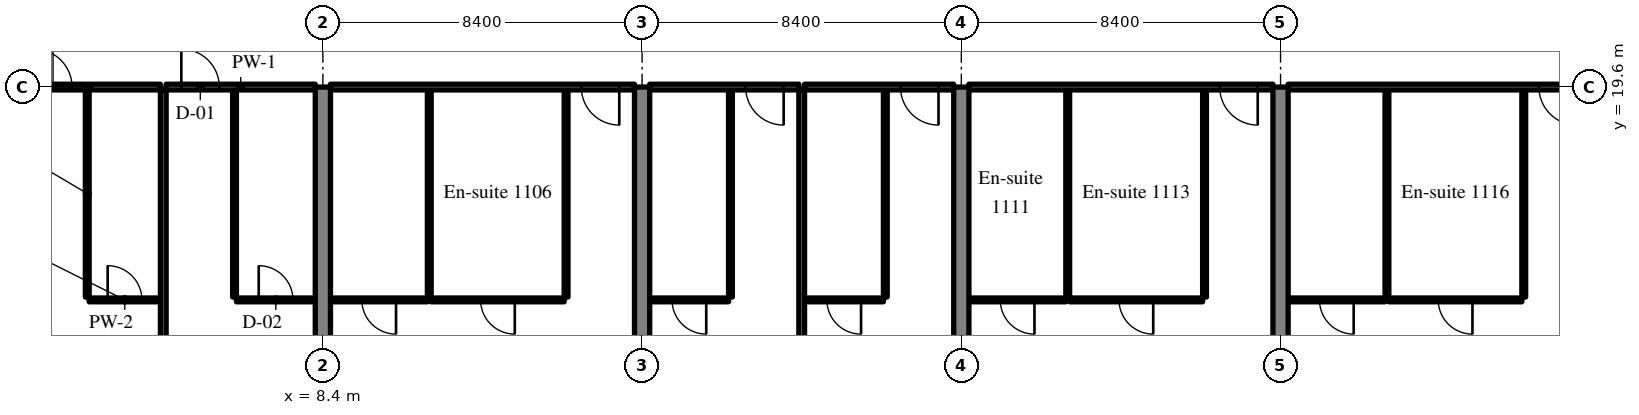
"""IFC4 building model, lengths in metres.
Left out: names, types, materials, properties, quantities, classifications, styles, units other than length and angle.
Written with IfcOpenShell. Run it as: python <this file> out.ifc"""

import sys

from ifc_helpers import new_model, si_unit, direction, frame, frame_2d, origin, place, context, subcontext, project, spatial, rectangle, extrude, source, transform, mapped, element, fill, save


model = new_model("IFC4")
c1 = context("Model", 3, precision=1e-05, world=origin(), true_north=direction((0.0, 1.0)))
c2 = subcontext(c1, "Body", "Model", "MODEL_VIEW")
j1 = project(units=[si_unit("LENGTHUNIT", "METRE"), si_unit("PLANEANGLEUNIT", "RADIAN")], contexts=[c1])
p1 = place(None, origin())
s1 = spatial("IfcSite", under=j1, at=p1, CompositionType="ELEMENT")
p2 = place(p1, origin())
s2 = spatial("IfcBuilding", under=s1, at=p2, CompositionType="ELEMENT")
p3 = place(p2, frame((0.0, 0.0, 50.6)))
s3 = spatial("IfcBuildingStorey", under=s2, at=p3, CompositionType="ELEMENT", Elevation=50.6)
m1 = source(origin(), c2, "Body", "SweptSolid", [
    extrude(rectangle(XDim=19.6, YDim=0.4, at=frame_2d((9.8, 0.0))), origin(), (0.0, 0.0, 1.0), 3.52),
])
for number, where, z_axis, x_axis in (
    (1, (8.4, 0.0, 0.0), (0.0, 0.0, 1.0), (0.0, 1.0, 0.0)),
    (2, (16.8, 0.0, 0.0), (0.0, 0.0, 1.0), (0.0, 1.0, 0.0)),
    (3, (25.2, 0.0, 0.0), (0.0, 0.0, 1.0), (0.0, 1.0, 0.0)),
    (4, (33.6, 0.0, 0.0), (0.0, 0.0, 1.0), (0.0, 1.0, 0.0)),
):
    element("IfcWall", number, at=place(p3, frame(where, z_axis=z_axis, x_axis=x_axis)), inside=s3, PredefinedType="SHEAR", context=c2, shape_type="MappedRepresentation", body=[
        mapped(m1, transform((0.0, 0.0, 0.0), scale=1.0)),
    ])
m2 = source(origin(), c2, "Body", "SweptSolid", [
    extrude(rectangle(XDim=5.45, YDim=0.1, at=frame_2d((2.725, 0.0))), origin(), (0.0, 0.0, 1.0), 3.52),
])
p4 = place(p3, frame((2.2, 14.075, 0.0), z_axis=(0.0, 0.0, 1.0), x_axis=(0.0, 1.0, 0.0)))
e5 = element("IfcWall", 5, at=p4, inside=s3, PredefinedType="PARTITIONING", context=c2, shape_type="MappedRepresentation", body=[
    mapped(m2, transform((0.0, 0.0, 0.0), scale=1.0)),
])
m3 = source(origin(), c2, "Body", "SweptSolid", [
    extrude(rectangle(XDim=1.875, YDim=0.1, at=frame_2d((0.938, 0.0))), origin(), (0.0, 0.0, 1.0), 3.52),
])
p5 = place(p3, frame((2.25, 14.0, 0.0), z_axis=(0.0, 0.0, 1.0), x_axis=(1.0, 0.0, 0.0)))
e6 = element("IfcWall", 6, at=p5, inside=s3, PredefinedType="PARTITIONING", context=c2, shape_type="MappedRepresentation", body=[
    mapped(m3, transform((0.0, 0.0, 0.0), scale=1.0)),
])
m4 = source(origin(), c2, "Body", "SweptSolid", [
    extrude(rectangle(XDim=0.9, YDim=2.1, at=frame_2d((0.45, 1.05))), frame((0.0, 0.06, 0.0), z_axis=(0.0, -1.0, 0.0), x_axis=(1.0, 0.0, 0.0)), (0.0, 0.0, 1.0), 0.12),
])
p6 = place(p5, frame((0.487, 0.0, 0.0)))
e7 = element("IfcOpeningElement", 7, at=p6, cuts=e6, PredefinedType="OPENING", context=c2, shape_type="MappedRepresentation", body=[
    mapped(m4, transform((0.0, 0.0, 0.0), scale=1.0)),
])
m5 = source(origin(), c2, "Body", "SweptSolid", [
    extrude(rectangle(XDim=3.725, YDim=0.15, at=frame_2d((1.863, 0.0))), origin(), (0.0, 0.0, 1.0), 2.82),
])
p7 = place(p3, frame((0.4, 19.6, 0.0), z_axis=(0.0, 0.0, 1.0), x_axis=(1.0, 0.0, 0.0)))
e8 = element("IfcWall", 8, at=p7, inside=s3, PredefinedType="PARTITIONING", context=c2, shape_type="MappedRepresentation", body=[
    mapped(m5, transform((0.0, 0.0, 0.0), scale=1.0)),
])
m6 = source(origin(), c2, "Body", "SweptSolid", [
    extrude(rectangle(XDim=1.0, YDim=2.1, at=frame_2d((0.5, 1.05))), frame((0.0, 0.085, 0.0), z_axis=(0.0, -1.0, 0.0), x_axis=(1.0, 0.0, 0.0)), (0.0, 0.0, 1.0), 0.17),
])
p8 = place(p7, frame((0.4, 0.0, 0.0)))
e9 = element("IfcOpeningElement", 9, at=p8, cuts=e8, PredefinedType="OPENING", context=c2, shape_type="MappedRepresentation", body=[
    mapped(m6, transform((0.0, 0.0, 0.0), scale=1.0)),
])
p9 = place(p3, frame((6.075, 14.075, 0.0), z_axis=(0.0, 0.0, 1.0), x_axis=(0.0, 1.0, 0.0)))
e10 = element("IfcWall", 10, at=p9, inside=s3, PredefinedType="PARTITIONING", context=c2, shape_type="MappedRepresentation", body=[
    mapped(m2, transform((0.0, 0.0, 0.0), scale=1.0)),
])
m7 = source(origin(), c2, "Body", "SweptSolid", [
    extrude(rectangle(XDim=2.075, YDim=0.1, at=frame_2d((1.038, 0.0))), origin(), (0.0, 0.0, 1.0), 3.52),
])
p10 = place(p3, frame((6.125, 14.0, 0.0), z_axis=(0.0, 0.0, 1.0), x_axis=(1.0, 0.0, 0.0)))
e11 = element("IfcWall", 11, at=p10, inside=s3, PredefinedType="PARTITIONING", context=c2, shape_type="MappedRepresentation", body=[
    mapped(m7, transform((0.0, 0.0, 0.0), scale=1.0)),
])
p11 = place(p10, frame((0.587, 0.0, 0.0)))
e12 = element("IfcOpeningElement", 12, at=p11, cuts=e11, PredefinedType="OPENING", context=c2, shape_type="MappedRepresentation", body=[
    mapped(m4, transform((0.0, 0.0, 0.0), scale=1.0)),
])
m8 = source(origin(), c2, "Body", "SweptSolid", [
    extrude(rectangle(XDim=3.925, YDim=0.15, at=frame_2d((1.962, 0.0))), origin(), (0.0, 0.0, 1.0), 2.82),
])
p12 = place(p3, frame((4.275, 19.6, 0.0), z_axis=(0.0, 0.0, 1.0), x_axis=(1.0, 0.0, 0.0)))
e13 = element("IfcWall", 13, at=p12, inside=s3, PredefinedType="PARTITIONING", context=c2, shape_type="MappedRepresentation", body=[
    mapped(m8, transform((0.0, 0.0, 0.0), scale=1.0)),
])
p13 = place(p12, frame((0.4, 0.0, 0.0)))
e14 = element("IfcOpeningElement", 14, at=p13, cuts=e13, PredefinedType="OPENING", context=c2, shape_type="MappedRepresentation", body=[
    mapped(m6, transform((0.0, 0.0, 0.0), scale=1.0)),
])
m9 = source(origin(), c2, "Body", "SweptSolid", [
    extrude(rectangle(XDim=18.947, YDim=0.15, at=frame_2d((9.474, 0.0))), origin(), (0.0, 0.0, 1.0), 3.52),
])
p14 = place(p3, frame((4.2, 0.578, 0.0), z_axis=(0.0, 0.0, 1.0), x_axis=(0.0, 1.0, 0.0)))
e15 = element("IfcWall", 15, at=p14, inside=s3, PredefinedType="PARTITIONING", context=c2, shape_type="MappedRepresentation", body=[
    mapped(m9, transform((0.0, 0.0, 0.0), scale=1.0)),
])
for number, where, z_axis, x_axis in (
    (16, (14.8, 14.075, 0.0), (0.0, 0.0, 1.0), (0.0, 1.0, 0.0)),
    (17, (11.2, 14.075, 0.0), (0.0, 0.0, 1.0), (0.0, 1.0, 0.0)),
):
    element("IfcWall", number, at=place(p3, frame(where, z_axis=z_axis, x_axis=x_axis)), inside=s3, PredefinedType="PARTITIONING", context=c2, shape_type="MappedRepresentation", body=[
        mapped(m2, transform((0.0, 0.0, 0.0), scale=1.0)),
    ])
m10 = source(origin(), c2, "Body", "SweptSolid", [
    extrude(rectangle(XDim=3.5, YDim=0.1, at=frame_2d((1.75, 0.0))), origin(), (0.0, 0.0, 1.0), 3.52),
])
p15 = place(p3, frame((11.25, 14.0, 0.0), z_axis=(0.0, 0.0, 1.0), x_axis=(1.0, 0.0, 0.0)))
e18 = element("IfcWall", 18, at=p15, inside=s3, PredefinedType="PARTITIONING", context=c2, shape_type="MappedRepresentation", body=[
    mapped(m10, transform((0.0, 0.0, 0.0), scale=1.0)),
])
p16 = place(p15, frame((1.3, 0.0, 0.0)))
e19 = element("IfcOpeningElement", 19, at=p16, cuts=e18, PredefinedType="OPENING", context=c2, shape_type="MappedRepresentation", body=[
    mapped(m4, transform((0.0, 0.0, 0.0), scale=1.0)),
])
m11 = source(origin(), c2, "Body", "SweptSolid", [
    extrude(rectangle(XDim=2.55, YDim=0.1, at=frame_2d((1.275, 0.0))), origin(), (0.0, 0.0, 1.0), 3.52),
])
p17 = place(p3, frame((8.6, 14.0, 0.0), z_axis=(0.0, 0.0, 1.0), x_axis=(1.0, 0.0, 0.0)))
e20 = element("IfcWall", 20, at=p17, inside=s3, PredefinedType="PARTITIONING", context=c2, shape_type="MappedRepresentation", body=[
    mapped(m11, transform((0.0, 0.0, 0.0), scale=1.0)),
])
p18 = place(p17, frame((0.825, 0.0, 0.0)))
e21 = element("IfcOpeningElement", 21, at=p18, cuts=e20, PredefinedType="OPENING", context=c2, shape_type="MappedRepresentation", body=[
    mapped(m4, transform((0.0, 0.0, 0.0), scale=1.0)),
])
m12 = source(origin(), c2, "Body", "SweptSolid", [
    extrude(rectangle(XDim=8.0, YDim=0.15, at=frame_2d((4.0, 0.0))), origin(), (0.0, 0.0, 1.0), 2.82),
])
p19 = place(p3, frame((8.6, 19.6, 0.0), z_axis=(0.0, 0.0, 1.0), x_axis=(1.0, 0.0, 0.0)))
e22 = element("IfcWall", 22, at=p19, inside=s3, PredefinedType="PARTITIONING", context=c2, shape_type="MappedRepresentation", body=[
    mapped(m12, transform((0.0, 0.0, 0.0), scale=1.0)),
])
p20 = place(p19, frame((6.6, 0.0, 0.0)))
e23 = element("IfcOpeningElement", 23, at=p20, cuts=e22, PredefinedType="OPENING", context=c2, shape_type="MappedRepresentation", body=[
    mapped(m6, transform((0.0, 0.0, 0.0), scale=1.0)),
])
p21 = place(p3, frame((19.125, 14.075, 0.0), z_axis=(0.0, 0.0, 1.0), x_axis=(0.0, 1.0, 0.0)))
e24 = element("IfcWall", 24, at=p21, inside=s3, PredefinedType="PARTITIONING", context=c2, shape_type="MappedRepresentation", body=[
    mapped(m2, transform((0.0, 0.0, 0.0), scale=1.0)),
])
p22 = place(p3, frame((17.0, 14.0, 0.0), z_axis=(0.0, 0.0, 1.0), x_axis=(1.0, 0.0, 0.0)))
e25 = element("IfcWall", 25, at=p22, inside=s3, PredefinedType="PARTITIONING", context=c2, shape_type="MappedRepresentation", body=[
    mapped(m7, transform((0.0, 0.0, 0.0), scale=1.0)),
])
p23 = place(p22, frame((0.588, 0.0, 0.0)))
e26 = element("IfcOpeningElement", 26, at=p23, cuts=e25, PredefinedType="OPENING", context=c2, shape_type="MappedRepresentation", body=[
    mapped(m4, transform((0.0, 0.0, 0.0), scale=1.0)),
])
p24 = place(p3, frame((17.0, 19.6, 0.0), z_axis=(0.0, 0.0, 1.0), x_axis=(1.0, 0.0, 0.0)))
e27 = element("IfcWall", 27, at=p24, inside=s3, PredefinedType="PARTITIONING", context=c2, shape_type="MappedRepresentation", body=[
    mapped(m8, transform((0.0, 0.0, 0.0), scale=1.0)),
])
p25 = place(p24, frame((2.525, 0.0, 0.0)))
e28 = element("IfcOpeningElement", 28, at=p25, cuts=e27, PredefinedType="OPENING", context=c2, shape_type="MappedRepresentation", body=[
    mapped(m6, transform((0.0, 0.0, 0.0), scale=1.0)),
])
p26 = place(p3, frame((23.2, 14.075, 0.0), z_axis=(0.0, 0.0, 1.0), x_axis=(0.0, 1.0, 0.0)))
e29 = element("IfcWall", 29, at=p26, inside=s3, PredefinedType="PARTITIONING", context=c2, shape_type="MappedRepresentation", body=[
    mapped(m2, transform((0.0, 0.0, 0.0), scale=1.0)),
])
p27 = place(p3, frame((21.075, 14.0, 0.0), z_axis=(0.0, 0.0, 1.0), x_axis=(1.0, 0.0, 0.0)))
e30 = element("IfcWall", 30, at=p27, inside=s3, PredefinedType="PARTITIONING", context=c2, shape_type="MappedRepresentation", body=[
    mapped(m7, transform((0.0, 0.0, 0.0), scale=1.0)),
])
p28 = place(p27, frame((0.587, 0.0, 0.0)))
e31 = element("IfcOpeningElement", 31, at=p28, cuts=e30, PredefinedType="OPENING", context=c2, shape_type="MappedRepresentation", body=[
    mapped(m4, transform((0.0, 0.0, 0.0), scale=1.0)),
])
p29 = place(p3, frame((21.075, 19.6, 0.0), z_axis=(0.0, 0.0, 1.0), x_axis=(1.0, 0.0, 0.0)))
e32 = element("IfcWall", 32, at=p29, inside=s3, PredefinedType="PARTITIONING", context=c2, shape_type="MappedRepresentation", body=[
    mapped(m8, transform((0.0, 0.0, 0.0), scale=1.0)),
])
p30 = place(p29, frame((2.525, 0.0, 0.0)))
e33 = element("IfcOpeningElement", 33, at=p30, cuts=e32, PredefinedType="OPENING", context=c2, shape_type="MappedRepresentation", body=[
    mapped(m6, transform((0.0, 0.0, 0.0), scale=1.0)),
])
m13 = source(origin(), c2, "Body", "SweptSolid", [
    extrude(rectangle(XDim=18.725, YDim=0.15, at=frame_2d((9.362, 0.0))), origin(), (0.0, 0.0, 1.0), 3.52),
])
p31 = place(p3, frame((21.0, 0.8, 0.0), z_axis=(0.0, 0.0, 1.0), x_axis=(0.0, 1.0, 0.0)))
e34 = element("IfcWall", 34, at=p31, inside=s3, PredefinedType="PARTITIONING", context=c2, shape_type="MappedRepresentation", body=[
    mapped(m13, transform((0.0, 0.0, 0.0), scale=1.0)),
])
for number, where, z_axis, x_axis in (
    (35, (31.6, 14.075, 0.0), (0.0, 0.0, 1.0), (0.0, 1.0, 0.0)),
    (36, (28.0, 14.075, 0.0), (0.0, 0.0, 1.0), (0.0, 1.0, 0.0)),
):
    element("IfcWall", number, at=place(p3, frame(where, z_axis=z_axis, x_axis=x_axis)), inside=s3, PredefinedType="PARTITIONING", context=c2, shape_type="MappedRepresentation", body=[
        mapped(m2, transform((0.0, 0.0, 0.0), scale=1.0)),
    ])
p32 = place(p3, frame((28.05, 14.0, 0.0), z_axis=(0.0, 0.0, 1.0), x_axis=(1.0, 0.0, 0.0)))
e37 = element("IfcWall", 37, at=p32, inside=s3, PredefinedType="PARTITIONING", context=c2, shape_type="MappedRepresentation", body=[
    mapped(m10, transform((0.0, 0.0, 0.0), scale=1.0)),
])
p33 = place(p32, frame((1.3, 0.0, 0.0)))
e38 = element("IfcOpeningElement", 38, at=p33, cuts=e37, PredefinedType="OPENING", context=c2, shape_type="MappedRepresentation", body=[
    mapped(m4, transform((0.0, 0.0, 0.0), scale=1.0)),
])
m14 = source(origin(), c2, "Body", "SweptSolid", [
    extrude(rectangle(XDim=2.55, YDim=0.1, at=frame_2d((1.275, 0.0))), origin(), (0.0, 0.0, 1.0), 3.52),
])
p34 = place(p3, frame((25.4, 14.0, 0.0), z_axis=(0.0, 0.0, 1.0), x_axis=(1.0, 0.0, 0.0)))
e39 = element("IfcWall", 39, at=p34, inside=s3, PredefinedType="PARTITIONING", context=c2, shape_type="MappedRepresentation", body=[
    mapped(m14, transform((0.0, 0.0, 0.0), scale=1.0)),
])
p35 = place(p34, frame((0.825, 0.0, 0.0)))
e40 = element("IfcOpeningElement", 40, at=p35, cuts=e39, PredefinedType="OPENING", context=c2, shape_type="MappedRepresentation", body=[
    mapped(m4, transform((0.0, 0.0, 0.0), scale=1.0)),
])
p36 = place(p3, frame((25.4, 19.6, 0.0), z_axis=(0.0, 0.0, 1.0), x_axis=(1.0, 0.0, 0.0)))
e41 = element("IfcWall", 41, at=p36, inside=s3, PredefinedType="PARTITIONING", context=c2, shape_type="MappedRepresentation", body=[
    mapped(m12, transform((0.0, 0.0, 0.0), scale=1.0)),
])
p37 = place(p36, frame((6.6, 0.0, 0.0)))
e42 = element("IfcOpeningElement", 42, at=p37, cuts=e41, PredefinedType="OPENING", context=c2, shape_type="MappedRepresentation", body=[
    mapped(m6, transform((0.0, 0.0, 0.0), scale=1.0)),
])
for number, where, z_axis, x_axis in (
    (43, (40.0, 14.075, 0.0), (0.0, 0.0, 1.0), (0.0, 1.0, 0.0)),
    (44, (36.4, 14.075, 0.0), (0.0, 0.0, 1.0), (0.0, 1.0, 0.0)),
):
    element("IfcWall", number, at=place(p3, frame(where, z_axis=z_axis, x_axis=x_axis)), inside=s3, PredefinedType="PARTITIONING", context=c2, shape_type="MappedRepresentation", body=[
        mapped(m2, transform((0.0, 0.0, 0.0), scale=1.0)),
    ])
p38 = place(p3, frame((36.45, 14.0, 0.0), z_axis=(0.0, 0.0, 1.0), x_axis=(1.0, 0.0, 0.0)))
e45 = element("IfcWall", 45, at=p38, inside=s3, PredefinedType="PARTITIONING", context=c2, shape_type="MappedRepresentation", body=[
    mapped(m10, transform((0.0, 0.0, 0.0), scale=1.0)),
])
p39 = place(p38, frame((1.3, 0.0, 0.0)))
e46 = element("IfcOpeningElement", 46, at=p39, cuts=e45, PredefinedType="OPENING", context=c2, shape_type="MappedRepresentation", body=[
    mapped(m4, transform((0.0, 0.0, 0.0), scale=1.0)),
])
p40 = place(p3, frame((33.8, 14.0, 0.0), z_axis=(0.0, 0.0, 1.0), x_axis=(1.0, 0.0, 0.0)))
e47 = element("IfcWall", 47, at=p40, inside=s3, PredefinedType="PARTITIONING", context=c2, shape_type="MappedRepresentation", body=[
    mapped(m14, transform((0.0, 0.0, 0.0), scale=1.0)),
])
p41 = place(p40, frame((0.825, 0.0, 0.0)))
e48 = element("IfcOpeningElement", 48, at=p41, cuts=e47, PredefinedType="OPENING", context=c2, shape_type="MappedRepresentation", body=[
    mapped(m4, transform((0.0, 0.0, 0.0), scale=1.0)),
])
p42 = place(p3, frame((33.8, 19.6, 0.0), z_axis=(0.0, 0.0, 1.0), x_axis=(1.0, 0.0, 0.0)))
e49 = element("IfcWall", 49, at=p42, inside=s3, PredefinedType="PARTITIONING", context=c2, shape_type="MappedRepresentation", body=[
    mapped(m12, transform((0.0, 0.0, 0.0), scale=1.0)),
])
p43 = place(p42, frame((6.6, 0.0, 0.0)))
e50 = element("IfcOpeningElement", 50, at=p43, cuts=e49, PredefinedType="OPENING", context=c2, shape_type="MappedRepresentation", body=[
    mapped(m6, transform((0.0, 0.0, 0.0), scale=1.0)),
])
m15 = source(origin(), c2, "Body", "SweptSolid", [
    extrude(rectangle(XDim=0.9, YDim=2.1, at=frame_2d((0.45, 1.05))), frame((0.0, 0.025, 0.0), z_axis=(0.0, -1.0, 0.0), x_axis=(1.0, 0.0, 0.0)), (0.0, 0.0, 1.0), 0.05),
])
p44 = place(p6, origin())
e51 = element("IfcDoor", 51, at=p44, inside=s3, OperationType="SINGLE_SWING_LEFT", PredefinedType="DOOR", context=c2, shape_type="MappedRepresentation", body=[
    mapped(m15, transform((0.0, 0.0, 0.0), scale=1.0)),
])
fill(e7, e51)
m16 = source(origin(), c2, "Body", "SweptSolid", [
    extrude(rectangle(XDim=1.0, YDim=2.1, at=frame_2d((0.5, 1.05))), frame((0.0, 0.025, 0.0), z_axis=(0.0, -1.0, 0.0), x_axis=(1.0, 0.0, 0.0)), (0.0, 0.0, 1.0), 0.05),
])
p45 = place(p8, origin())
e52 = element("IfcDoor", 52, at=p45, inside=s3, OperationType="SINGLE_SWING_LEFT", PredefinedType="DOOR", context=c2, shape_type="MappedRepresentation", body=[
    mapped(m16, transform((0.0, 0.0, 0.0), scale=1.0)),
])
fill(e9, e52)
p46 = place(p11, origin())
e53 = element("IfcDoor", 53, at=p46, inside=s3, OperationType="SINGLE_SWING_LEFT", PredefinedType="DOOR", context=c2, shape_type="MappedRepresentation", body=[
    mapped(m15, transform((0.0, 0.0, 0.0), scale=1.0)),
])
fill(e12, e53)
p47 = place(p13, origin())
e54 = element("IfcDoor", 54, at=p47, inside=s3, OperationType="SINGLE_SWING_LEFT", PredefinedType="DOOR", context=c2, shape_type="MappedRepresentation", body=[
    mapped(m16, transform((0.0, 0.0, 0.0), scale=1.0)),
])
fill(e14, e54)
p48 = place(p16, origin())
e55 = element("IfcDoor", 55, at=p48, inside=s3, OperationType="SINGLE_SWING_RIGHT", PredefinedType="DOOR", context=c2, shape_type="MappedRepresentation", body=[
    mapped(m15, transform((0.0, 0.0, 0.0), scale=1.0)),
])
fill(e19, e55)
p49 = place(p18, origin())
e56 = element("IfcDoor", 56, at=p49, inside=s3, OperationType="SINGLE_SWING_RIGHT", PredefinedType="DOOR", context=c2, shape_type="MappedRepresentation", body=[
    mapped(m15, transform((0.0, 0.0, 0.0), scale=1.0)),
])
fill(e21, e56)
p50 = place(p20, origin())
e57 = element("IfcDoor", 57, at=p50, inside=s3, OperationType="SINGLE_SWING_RIGHT", PredefinedType="DOOR", context=c2, shape_type="MappedRepresentation", body=[
    mapped(m16, transform((0.0, 0.0, 0.0), scale=1.0)),
])
fill(e23, e57)
p51 = place(p23, origin())
e58 = element("IfcDoor", 58, at=p51, inside=s3, OperationType="SINGLE_SWING_RIGHT", PredefinedType="DOOR", context=c2, shape_type="MappedRepresentation", body=[
    mapped(m15, transform((0.0, 0.0, 0.0), scale=1.0)),
])
fill(e26, e58)
p52 = place(p25, origin())
e59 = element("IfcDoor", 59, at=p52, inside=s3, OperationType="SINGLE_SWING_RIGHT", PredefinedType="DOOR", context=c2, shape_type="MappedRepresentation", body=[
    mapped(m16, transform((0.0, 0.0, 0.0), scale=1.0)),
])
fill(e28, e59)
p53 = place(p28, origin())
e60 = element("IfcDoor", 60, at=p53, inside=s3, OperationType="SINGLE_SWING_RIGHT", PredefinedType="DOOR", context=c2, shape_type="MappedRepresentation", body=[
    mapped(m15, transform((0.0, 0.0, 0.0), scale=1.0)),
])
fill(e31, e60)
p54 = place(p30, origin())
e61 = element("IfcDoor", 61, at=p54, inside=s3, OperationType="SINGLE_SWING_RIGHT", PredefinedType="DOOR", context=c2, shape_type="MappedRepresentation", body=[
    mapped(m16, transform((0.0, 0.0, 0.0), scale=1.0)),
])
fill(e33, e61)
p55 = place(p33, origin())
e62 = element("IfcDoor", 62, at=p55, inside=s3, OperationType="SINGLE_SWING_RIGHT", PredefinedType="DOOR", context=c2, shape_type="MappedRepresentation", body=[
    mapped(m15, transform((0.0, 0.0, 0.0), scale=1.0)),
])
fill(e38, e62)
p56 = place(p35, origin())
e63 = element("IfcDoor", 63, at=p56, inside=s3, OperationType="SINGLE_SWING_RIGHT", PredefinedType="DOOR", context=c2, shape_type="MappedRepresentation", body=[
    mapped(m15, transform((0.0, 0.0, 0.0), scale=1.0)),
])
fill(e40, e63)
p57 = place(p37, origin())
e64 = element("IfcDoor", 64, at=p57, inside=s3, OperationType="SINGLE_SWING_RIGHT", PredefinedType="DOOR", context=c2, shape_type="MappedRepresentation", body=[
    mapped(m16, transform((0.0, 0.0, 0.0), scale=1.0)),
])
fill(e42, e64)
p58 = place(p39, origin())
e65 = element("IfcDoor", 65, at=p58, inside=s3, OperationType="SINGLE_SWING_RIGHT", PredefinedType="DOOR", context=c2, shape_type="MappedRepresentation", body=[
    mapped(m15, transform((0.0, 0.0, 0.0), scale=1.0)),
])
fill(e46, e65)
p59 = place(p41, origin())
e66 = element("IfcDoor", 66, at=p59, inside=s3, OperationType="SINGLE_SWING_RIGHT", PredefinedType="DOOR", context=c2, shape_type="MappedRepresentation", body=[
    mapped(m15, transform((0.0, 0.0, 0.0), scale=1.0)),
])
fill(e48, e66)
p60 = place(p43, origin())
e67 = element("IfcDoor", 67, at=p60, inside=s3, OperationType="SINGLE_SWING_RIGHT", PredefinedType="DOOR", context=c2, shape_type="MappedRepresentation", body=[
    mapped(m16, transform((0.0, 0.0, 0.0), scale=1.0)),
])
fill(e50, e67)
save(model, sys.argv[1])
